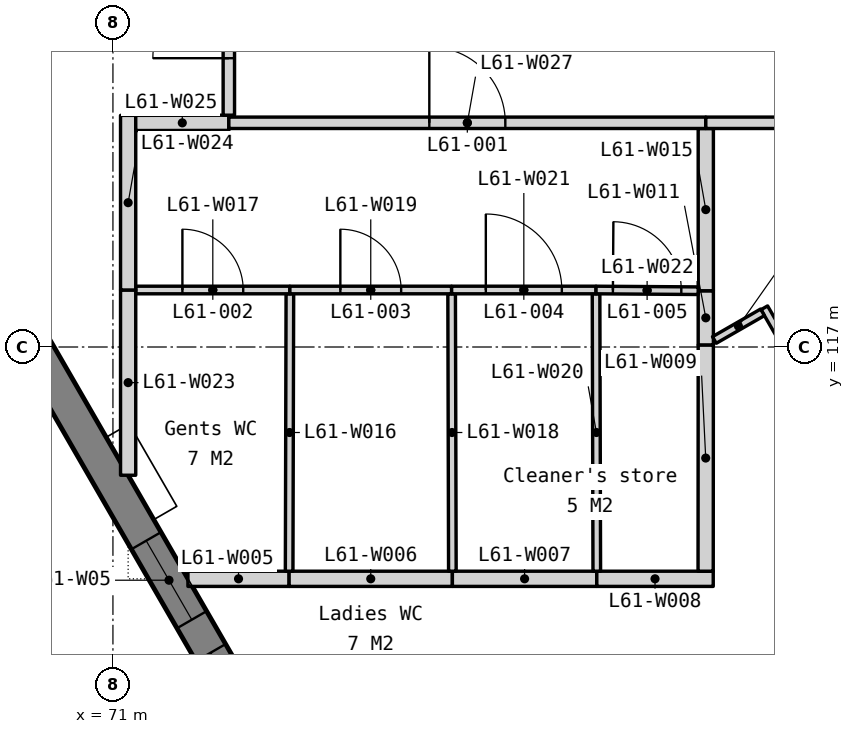
"""IFC4 building model, lengths in metres.
Left out: names, types, materials, properties, quantities, classifications, styles, units other than length and angle.
Written with IfcOpenShell. Run it as: python <this file> out.ifc"""

import sys

from ifc_helpers import new_model, si_unit, direction, frame, frame_2d, origin, place, context, subcontext, project, spatial, polyline, rectangle, outline, extrude, element, fill, save


model = new_model("IFC4")
c1 = context("Model", 3, precision=1e-05, world=origin(), true_north=direction((0.0, 1.0)))
c2 = subcontext(c1, "Body", "Model", "MODEL_VIEW")
j1 = project(units=[si_unit("LENGTHUNIT", "METRE"), si_unit("PLANEANGLEUNIT", "RADIAN")], contexts=[c1])
p1 = place(None, origin())
s1 = spatial("IfcSite", under=j1, at=p1, CompositionType="ELEMENT")
p2 = place(p1, origin())
s2 = spatial("IfcBuilding", under=s1, at=p2, CompositionType="ELEMENT")
p3 = place(p2, frame((0.0, 0.0, 250.4)))
s3 = spatial("IfcBuildingStorey", under=s2, at=p3, CompositionType="ELEMENT", Elevation=250.4)
p4 = place(p3, frame((60.609, 133.207, -0.15), z_axis=(0.0, 0.0, 1.0), x_axis=(0.500002536638, -0.866023939251, 0.0)))
e1 = element("IfcWall", 1, at=p4, inside=s3, PredefinedType="SOLIDWALL", context=c2, shape_type="SweptSolid", body=[
    extrude(outline(polyline([(36.972, 0.0), (36.972, 3.9), (0.0, 3.9), (0.0, 0.0), (36.972, 0.0)])), frame((0.0, 0.225, 0.0), z_axis=(0.0, -1.0, 0.0), x_axis=(1.0, 0.0, 0.0)), (0.0, 0.0, 1.0), 0.45),
])
p5 = place(p4, frame((3.172, 0.0, 0.95)))
e2 = element("IfcOpeningElement", 2, at=p5, cuts=e1, PredefinedType="OPENING", context=c2, shape_type="SweptSolid", body=[
    extrude(rectangle(XDim=1.2, YDim=2.2, at=frame_2d((0.6, 1.1))), frame((0.0, 0.235, 0.0), z_axis=(0.0, -1.0, 0.0), x_axis=(1.0, 0.0, 0.0)), (0.0, 0.0, 1.0), 0.47),
])
p6 = place(p4, frame((4.872, 0.0, 0.95)))
e3 = element("IfcOpeningElement", 3, at=p6, cuts=e1, PredefinedType="OPENING", context=c2, shape_type="SweptSolid", body=[
    extrude(rectangle(XDim=1.2, YDim=2.2, at=frame_2d((0.6, 1.1))), frame((0.0, 0.235, 0.0), z_axis=(0.0, -1.0, 0.0), x_axis=(1.0, 0.0, 0.0)), (0.0, 0.0, 1.0), 0.47),
])
p7 = place(p4, frame((12.415, 0.0, 0.95)))
e4 = element("IfcOpeningElement", 4, at=p7, cuts=e1, PredefinedType="OPENING", context=c2, shape_type="SweptSolid", body=[
    extrude(rectangle(XDim=1.2, YDim=2.2, at=frame_2d((0.6, 1.1))), frame((0.0, 0.235, 0.0), z_axis=(0.0, -1.0, 0.0), x_axis=(1.0, 0.0, 0.0)), (0.0, 0.0, 1.0), 0.47),
])
p8 = place(p4, frame((14.115, 0.0, 0.95)))
e5 = element("IfcOpeningElement", 5, at=p8, cuts=e1, PredefinedType="OPENING", context=c2, shape_type="SweptSolid", body=[
    extrude(rectangle(XDim=1.2, YDim=2.2, at=frame_2d((0.6, 1.1))), frame((0.0, 0.235, 0.0), z_axis=(0.0, -1.0, 0.0), x_axis=(1.0, 0.0, 0.0)), (0.0, 0.0, 1.0), 0.47),
])
p9 = place(p4, frame((21.658, 0.0, 0.95)))
e6 = element("IfcOpeningElement", 6, at=p9, cuts=e1, PredefinedType="OPENING", context=c2, shape_type="SweptSolid", body=[
    extrude(rectangle(XDim=1.2, YDim=2.2, at=frame_2d((0.6, 1.1))), frame((0.0, 0.235, 0.0), z_axis=(0.0, -1.0, 0.0), x_axis=(1.0, 0.0, 0.0)), (0.0, 0.0, 1.0), 0.47),
])
p10 = place(p4, frame((23.358, 0.0, 0.95)))
e7 = element("IfcOpeningElement", 7, at=p10, cuts=e1, PredefinedType="OPENING", context=c2, shape_type="SweptSolid", body=[
    extrude(rectangle(XDim=1.2, YDim=2.2, at=frame_2d((0.6, 1.1))), frame((0.0, 0.235, 0.0), z_axis=(0.0, -1.0, 0.0), x_axis=(1.0, 0.0, 0.0)), (0.0, 0.0, 1.0), 0.47),
])
p11 = place(p4, frame((30.901, 0.0, 0.95)))
e8 = element("IfcOpeningElement", 8, at=p11, cuts=e1, PredefinedType="OPENING", context=c2, shape_type="SweptSolid", body=[
    extrude(rectangle(XDim=1.2, YDim=2.2, at=frame_2d((0.6, 1.1))), frame((0.0, 0.235, 0.0), z_axis=(0.0, -1.0, 0.0), x_axis=(1.0, 0.0, 0.0)), (0.0, 0.0, 1.0), 0.47),
])
p12 = place(p4, frame((32.601, 0.0, 0.95)))
e9 = element("IfcOpeningElement", 9, at=p12, cuts=e1, PredefinedType="OPENING", context=c2, shape_type="SweptSolid", body=[
    extrude(rectangle(XDim=1.2, YDim=2.2, at=frame_2d((0.6, 1.1))), frame((0.0, 0.235, 0.0), z_axis=(0.0, -1.0, 0.0), x_axis=(1.0, 0.0, 0.0)), (0.0, 0.0, 1.0), 0.47),
])
p13 = place(p3, frame((71.987, 113.95, 0.0), z_axis=(0.0, 0.0, 1.0), x_axis=(1.0, 0.0, 0.0)))
e10 = element("IfcWall", 10, at=p13, inside=s3, PredefinedType="PARTITIONING", context=c2, shape_type="SweptSolid", body=[
    extrude(rectangle(XDim=1.331, YDim=0.2, at=frame_2d((0.666, 0.0))), origin(), (0.0, 0.0, 1.0), 3.75),
])
p14 = place(p3, frame((73.318, 113.95, 0.0), z_axis=(0.0, 0.0, 1.0), x_axis=(1.0, 0.0, 0.0)))
e11 = element("IfcWall", 11, at=p14, inside=s3, PredefinedType="PARTITIONING", context=c2, shape_type="SweptSolid", body=[
    extrude(rectangle(XDim=2.148, YDim=0.2, at=frame_2d((1.074, 0.0))), origin(), (0.0, 0.0, 1.0), 3.75),
])
p15 = place(p3, frame((75.466, 113.95, 0.0), z_axis=(0.0, 0.0, 1.0), x_axis=(1.0, 0.0, 0.0)))
e12 = element("IfcWall", 12, at=p15, inside=s3, PredefinedType="PARTITIONING", context=c2, shape_type="SweptSolid", body=[
    extrude(rectangle(XDim=1.9, YDim=0.2, at=frame_2d((0.95, 0.0))), origin(), (0.0, 0.0, 1.0), 3.75),
])
p16 = place(p3, frame((77.366, 113.95, 0.0), z_axis=(0.0, 0.0, 1.0), x_axis=(1.0, 0.0, 0.0)))
e13 = element("IfcWall", 13, at=p16, inside=s3, PredefinedType="PARTITIONING", context=c2, shape_type="SweptSolid", body=[
    extrude(rectangle(XDim=1.532, YDim=0.2, at=frame_2d((0.766, 0.0))), origin(), (0.0, 0.0, 1.0), 3.75),
])
p17 = place(p3, frame((78.798, 114.05, 0.0), z_axis=(0.0, 0.0, 1.0), x_axis=(0.000656006419, 0.999999784828, 0.0)))
e14 = element("IfcWall", 14, at=p17, inside=s3, PredefinedType="PARTITIONING", context=c2, shape_type="SweptSolid", body=[
    extrude(rectangle(XDim=2.977, YDim=0.2, at=frame_2d((1.489, 0.0))), origin(), (0.0, 0.0, 1.0), 3.75),
])
p18 = place(p3, frame((79.57, 117.516, 0.0), z_axis=(0.0, 0.0, 1.0), x_axis=(0.499861615673, -0.866105285272, 0.0)))
e15 = element("IfcWall", 15, at=p18, inside=s3, PredefinedType="PARTITIONING", context=c2, shape_type="SweptSolid", body=[
    extrude(rectangle(XDim=0.861, YDim=0.1, at=frame_2d((0.43, 0.0))), origin(), (0.0, 0.0, 1.0), 3.75),
])
p19 = place(p3, frame((78.8, 117.027, 0.0), z_axis=(0.0, 0.0, 1.0), x_axis=(0.0, 1.0, 0.0)))
e16 = element("IfcWall", 16, at=p19, inside=s3, PredefinedType="PARTITIONING", context=c2, shape_type="SweptSolid", body=[
    extrude(rectangle(XDim=0.713, YDim=0.2, at=frame_2d((0.356, 0.0))), origin(), (0.0, 0.0, 1.0), 3.75),
])
p20 = place(p3, frame((78.913, 117.092, 0.0), z_axis=(0.0, 0.0, 1.0), x_axis=(0.867068692485, 0.498188601347, 0.0)))
e17 = element("IfcWall", 17, at=p20, inside=s3, PredefinedType="PARTITIONING", context=c2, shape_type="SweptSolid", body=[
    extrude(rectangle(XDim=0.731, YDim=0.1, at=frame_2d((0.365, 0.0))), origin(), (0.0, 0.0, 1.0), 3.75),
])
p21 = place(p3, frame((78.8, 117.74, 0.0), z_axis=(0.0, 0.0, 1.0), x_axis=(0.0, 1.0, 0.0)))
e18 = element("IfcWall", 18, at=p21, inside=s3, PredefinedType="PARTITIONING", context=c2, shape_type="SweptSolid", body=[
    extrude(rectangle(XDim=2.135, YDim=0.2, at=frame_2d((1.067, 0.0))), origin(), (0.0, 0.0, 1.0), 3.75),
])
p22 = place(p3, frame((73.318, 114.05, 0.0), z_axis=(0.0, 0.0, 1.0), x_axis=(0.002608686776, 0.999996597371, 0.0)))
e19 = element("IfcWall", 19, at=p22, inside=s3, PredefinedType="PARTITIONING", context=c2, shape_type="SweptSolid", body=[
    extrude(rectangle(XDim=3.65, YDim=0.1, at=frame_2d((1.825, 0.0))), origin(), (0.0, 0.0, 1.0), 3.75),
])
p23 = place(p3, frame((71.3, 117.75, 0.0), z_axis=(0.0, 0.0, 1.0), x_axis=(1.0, 0.0, 0.0)))
e20 = element("IfcWall", 20, at=p23, inside=s3, PredefinedType="PARTITIONING", context=c2, shape_type="SweptSolid", body=[
    extrude(rectangle(XDim=2.028, YDim=0.1, at=frame_2d((1.014, 0.0))), origin(), (0.0, 0.0, 1.0), 3.75),
])
p24 = place(p23, frame((0.614, 0.0, 0.0)))
e21 = element("IfcOpeningElement", 21, at=p24, cuts=e20, PredefinedType="OPENING", context=c2, shape_type="SweptSolid", body=[
    extrude(rectangle(XDim=0.8, YDim=2.1, at=frame_2d((0.4, 1.05))), frame((0.0, 0.06, 0.0), z_axis=(0.0, -1.0, 0.0), x_axis=(1.0, 0.0, 0.0)), (0.0, 0.0, 1.0), 0.12),
])
p25 = place(p3, frame((75.466, 114.05, 0.0), z_axis=(0.0, 0.0, 1.0), x_axis=(-0.002675575707, 0.999996420641, 0.0)))
e22 = element("IfcWall", 22, at=p25, inside=s3, PredefinedType="PARTITIONING", context=c2, shape_type="SweptSolid", body=[
    extrude(rectangle(XDim=3.65, YDim=0.1, at=frame_2d((1.825, 0.0))), origin(), (0.0, 0.0, 1.0), 3.75),
])
p26 = place(p3, frame((73.328, 117.75, 0.0), z_axis=(0.0, 0.0, 1.0), x_axis=(1.0, 0.0, 0.0)))
e23 = element("IfcWall", 23, at=p26, inside=s3, PredefinedType="PARTITIONING", context=c2, shape_type="SweptSolid", body=[
    extrude(rectangle(XDim=2.128, YDim=0.1, at=frame_2d((1.064, 0.0))), origin(), (0.0, 0.0, 1.0), 3.75),
])
p27 = place(p26, frame((0.664, 0.0, 0.0)))
e24 = element("IfcOpeningElement", 24, at=p27, cuts=e23, PredefinedType="OPENING", context=c2, shape_type="SweptSolid", body=[
    extrude(rectangle(XDim=0.8, YDim=2.1, at=frame_2d((0.4, 1.05))), frame((0.0, 0.06, 0.0), z_axis=(0.0, -1.0, 0.0), x_axis=(1.0, 0.0, 0.0)), (0.0, 0.0, 1.0), 0.12),
])
p28 = place(p3, frame((77.366, 114.05, 0.0), z_axis=(0.0, 0.0, 1.0), x_axis=(-0.002608686776, 0.999996597371, 0.0)))
e25 = element("IfcWall", 25, at=p28, inside=s3, PredefinedType="PARTITIONING", context=c2, shape_type="SweptSolid", body=[
    extrude(rectangle(XDim=3.65, YDim=0.1, at=frame_2d((1.825, 0.0))), origin(), (0.0, 0.0, 1.0), 3.75),
])
p29 = place(p3, frame((75.456, 117.75, 0.0), z_axis=(0.0, 0.0, 1.0), x_axis=(1.0, 0.0, 0.0)))
e26 = element("IfcWall", 26, at=p29, inside=s3, PredefinedType="PARTITIONING", context=c2, shape_type="SweptSolid", body=[
    extrude(rectangle(XDim=1.9, YDim=0.1, at=frame_2d((0.95, 0.0))), origin(), (0.0, 0.0, 1.0), 3.75),
])
p30 = place(p29, frame((0.45, 0.0, 0.0)))
e27 = element("IfcOpeningElement", 27, at=p30, cuts=e26, PredefinedType="OPENING", context=c2, shape_type="SweptSolid", body=[
    extrude(rectangle(XDim=1.0, YDim=2.1, at=frame_2d((0.5, 1.05))), frame((0.0, 0.06, 0.0), z_axis=(0.0, -1.0, 0.0), x_axis=(1.0, 0.0, 0.0)), (0.0, 0.0, 1.0), 0.12),
])
p31 = place(p3, frame((77.356, 117.75, 0.0), z_axis=(0.0, 0.0, 1.0), x_axis=(0.99997617642, -0.006902651172, 0.0)))
e28 = element("IfcWall", 28, at=p31, inside=s3, PredefinedType="PARTITIONING", context=c2, shape_type="SweptSolid", body=[
    extrude(rectangle(XDim=1.344, YDim=0.1, at=frame_2d((0.672, 0.0))), origin(), (0.0, 0.0, 1.0), 3.75),
])
p32 = place(p31, frame((0.222, 0.0, 0.0)))
e29 = element("IfcOpeningElement", 29, at=p32, cuts=e28, PredefinedType="OPENING", context=c2, shape_type="SweptSolid", body=[
    extrude(rectangle(XDim=0.9, YDim=2.1, at=frame_2d((0.45, 1.05))), frame((0.0, 0.06, 0.0), z_axis=(0.0, -1.0, 0.0), x_axis=(1.0, 0.0, 0.0)), (0.0, 0.0, 1.0), 0.12),
])
p33 = place(p3, frame((71.2, 115.313, 0.0), z_axis=(0.0, 0.0, 1.0), x_axis=(0.0, 1.0, 0.0)))
e30 = element("IfcWall", 30, at=p33, inside=s3, PredefinedType="PARTITIONING", context=c2, shape_type="SweptSolid", body=[
    extrude(rectangle(XDim=2.437, YDim=0.2, at=frame_2d((1.219, 0.0))), origin(), (0.0, 0.0, 1.0), 3.062),
])
p34 = place(p3, frame((71.2, 117.75, 0.0), z_axis=(0.0, 0.0, 1.0), x_axis=(0.0, 1.0, 0.0)))
e31 = element("IfcWall", 31, at=p34, inside=s3, PredefinedType="PARTITIONING", context=c2, shape_type="SweptSolid", body=[
    extrude(rectangle(XDim=2.298, YDim=0.2, at=frame_2d((1.149, 0.0))), origin(), (0.0, 0.0, 1.0), 3.062),
])
p35 = place(p3, frame((71.3, 119.948, 0.0), z_axis=(0.0, 0.0, 1.0), x_axis=(0.999998728662, 0.001594576406, 0.0)))
e32 = element("IfcWall", 32, at=p35, inside=s3, PredefinedType="PARTITIONING", context=c2, shape_type="SweptSolid", body=[
    extrude(rectangle(XDim=1.225, YDim=0.2, at=frame_2d((0.612, 0.0))), origin(), (0.0, 0.0, 1.0), 3.75),
])
p36 = place(p3, frame((72.525, 120.05, 0.0), z_axis=(0.0, 0.0, 1.0), x_axis=(0.0, 1.0, 0.0)))
e33 = element("IfcWall", 33, at=p36, inside=s3, PredefinedType="PARTITIONING", context=c2, shape_type="SweptSolid", body=[
    extrude(rectangle(XDim=2.5, YDim=0.15, at=frame_2d((1.25, 0.0))), origin(), (0.0, 0.0, 1.0), 3.75),
])
p37 = place(p36, frame((0.75, 0.0, 0.0)))
e34 = element("IfcOpeningElement", 34, at=p37, cuts=e33, PredefinedType="OPENING", context=c2, shape_type="SweptSolid", body=[
    extrude(rectangle(XDim=1.0, YDim=2.1, at=frame_2d((0.5, 1.05))), frame((0.0, 0.085, 0.0), z_axis=(0.0, -1.0, 0.0), x_axis=(1.0, 0.0, 0.0)), (0.0, 0.0, 1.0), 0.17),
])
p38 = place(p3, frame((72.525, 119.95, 0.0), z_axis=(0.0, 0.0, 1.0), x_axis=(1.0, 0.0, 0.0)))
e35 = element("IfcWall", 35, at=p38, inside=s3, PredefinedType="PARTITIONING", context=c2, shape_type="SweptSolid", body=[
    extrude(rectangle(XDim=6.275, YDim=0.15, at=frame_2d((3.138, 0.0))), origin(), (0.0, 0.0, 1.0), 3.75),
])
p39 = place(p38, frame((2.637, 0.0, 0.0)))
e36 = element("IfcOpeningElement", 36, at=p39, cuts=e35, PredefinedType="OPENING", context=c2, shape_type="SweptSolid", body=[
    extrude(rectangle(XDim=1.0, YDim=2.1, at=frame_2d((0.5, 1.05))), frame((0.0, 0.085, 0.0), z_axis=(0.0, -1.0, 0.0), x_axis=(1.0, 0.0, 0.0)), (0.0, 0.0, 1.0), 0.17),
])
p40 = place(p3, frame((78.8, 119.95, 0.0), z_axis=(0.0, 0.0, 1.0), x_axis=(1.0, 0.0, 0.0)))
e37 = element("IfcWall", 37, at=p40, inside=s3, PredefinedType="PARTITIONING", context=c2, shape_type="SweptSolid", body=[
    extrude(rectangle(XDim=6.581, YDim=0.15, at=frame_2d((3.291, 0.0))), origin(), (0.0, 0.0, 1.0), 3.75),
])
p41 = place(p40, frame((2.791, 0.0, 0.0)))
e38 = element("IfcOpeningElement", 38, at=p41, cuts=e37, PredefinedType="OPENING", context=c2, shape_type="SweptSolid", body=[
    extrude(rectangle(XDim=1.0, YDim=2.1, at=frame_2d((0.5, 1.05))), frame((0.0, 0.085, 0.0), z_axis=(0.0, -1.0, 0.0), x_axis=(1.0, 0.0, 0.0)), (0.0, 0.0, 1.0), 0.17),
])
p42 = place(p9, origin())
e39 = element("IfcWindow", 39, at=p42, inside=s3, PartitioningType="SINGLE_PANEL", PredefinedType="WINDOW", context=c2, shape_type="SweptSolid", body=[
    extrude(rectangle(XDim=1.2, YDim=2.2, at=frame_2d((0.6, 1.1))), frame((0.0, 0.03, 0.0), z_axis=(0.0, -1.0, 0.0), x_axis=(1.0, 0.0, 0.0)), (0.0, 0.0, 1.0), 0.06),
])
fill(e6, e39)
p43 = place(p10, origin())
e40 = element("IfcWindow", 40, at=p43, inside=s3, PartitioningType="SINGLE_PANEL", PredefinedType="WINDOW", context=c2, shape_type="SweptSolid", body=[
    extrude(rectangle(XDim=1.2, YDim=2.2, at=frame_2d((0.6, 1.1))), frame((0.0, 0.03, 0.0), z_axis=(0.0, -1.0, 0.0), x_axis=(1.0, 0.0, 0.0)), (0.0, 0.0, 1.0), 0.06),
])
fill(e7, e40)
p44 = place(p39, origin())
e41 = element("IfcDoor", 41, at=p44, inside=s3, OperationType="SINGLE_SWING_LEFT", PredefinedType="DOOR", context=c2, shape_type="SweptSolid", body=[
    extrude(rectangle(XDim=1.0, YDim=2.1, at=frame_2d((0.5, 1.05))), frame((0.0, 0.025, 0.0), z_axis=(0.0, -1.0, 0.0), x_axis=(1.0, 0.0, 0.0)), (0.0, 0.0, 1.0), 0.05),
])
fill(e36, e41)
p45 = place(p24, origin())
e42 = element("IfcDoor", 42, at=p45, inside=s3, OperationType="SINGLE_SWING_LEFT", PredefinedType="DOOR", context=c2, shape_type="SweptSolid", body=[
    extrude(rectangle(XDim=0.8, YDim=2.1, at=frame_2d((0.4, 1.05))), frame((0.0, 0.025, 0.0), z_axis=(0.0, -1.0, 0.0), x_axis=(1.0, 0.0, 0.0)), (0.0, 0.0, 1.0), 0.05),
])
fill(e21, e42)
p46 = place(p27, origin())
e43 = element("IfcDoor", 43, at=p46, inside=s3, OperationType="SINGLE_SWING_LEFT", PredefinedType="DOOR", context=c2, shape_type="SweptSolid", body=[
    extrude(rectangle(XDim=0.8, YDim=2.1, at=frame_2d((0.4, 1.05))), frame((0.0, 0.025, 0.0), z_axis=(0.0, -1.0, 0.0), x_axis=(1.0, 0.0, 0.0)), (0.0, 0.0, 1.0), 0.05),
])
fill(e24, e43)
p47 = place(p30, origin())
e44 = element("IfcDoor", 44, at=p47, inside=s3, OperationType="SINGLE_SWING_LEFT", PredefinedType="DOOR", context=c2, shape_type="SweptSolid", body=[
    extrude(rectangle(XDim=1.0, YDim=2.1, at=frame_2d((0.5, 1.05))), frame((0.0, 0.025, 0.0), z_axis=(0.0, -1.0, 0.0), x_axis=(1.0, 0.0, 0.0)), (0.0, 0.0, 1.0), 0.05),
])
fill(e27, e44)
p48 = place(p32, origin())
e45 = element("IfcDoor", 45, at=p48, inside=s3, OperationType="SINGLE_SWING_LEFT", PredefinedType="DOOR", context=c2, shape_type="SweptSolid", body=[
    extrude(rectangle(XDim=0.9, YDim=2.1, at=frame_2d((0.45, 1.05))), frame((0.0, 0.025, 0.0), z_axis=(0.0, -1.0, 0.0), x_axis=(1.0, 0.0, 0.0)), (0.0, 0.0, 1.0), 0.05),
])
fill(e29, e45)
p49 = place(p37, origin())
e46 = element("IfcDoor", 46, at=p49, inside=s3, OperationType="SINGLE_SWING_LEFT", PredefinedType="DOOR", context=c2, shape_type="SweptSolid", body=[
    extrude(rectangle(XDim=1.0, YDim=2.1, at=frame_2d((0.5, 1.05))), frame((0.0, 0.025, 0.0), z_axis=(0.0, -1.0, 0.0), x_axis=(1.0, 0.0, 0.0)), (0.0, 0.0, 1.0), 0.05),
])
fill(e34, e46)
save(model, sys.argv[1])
